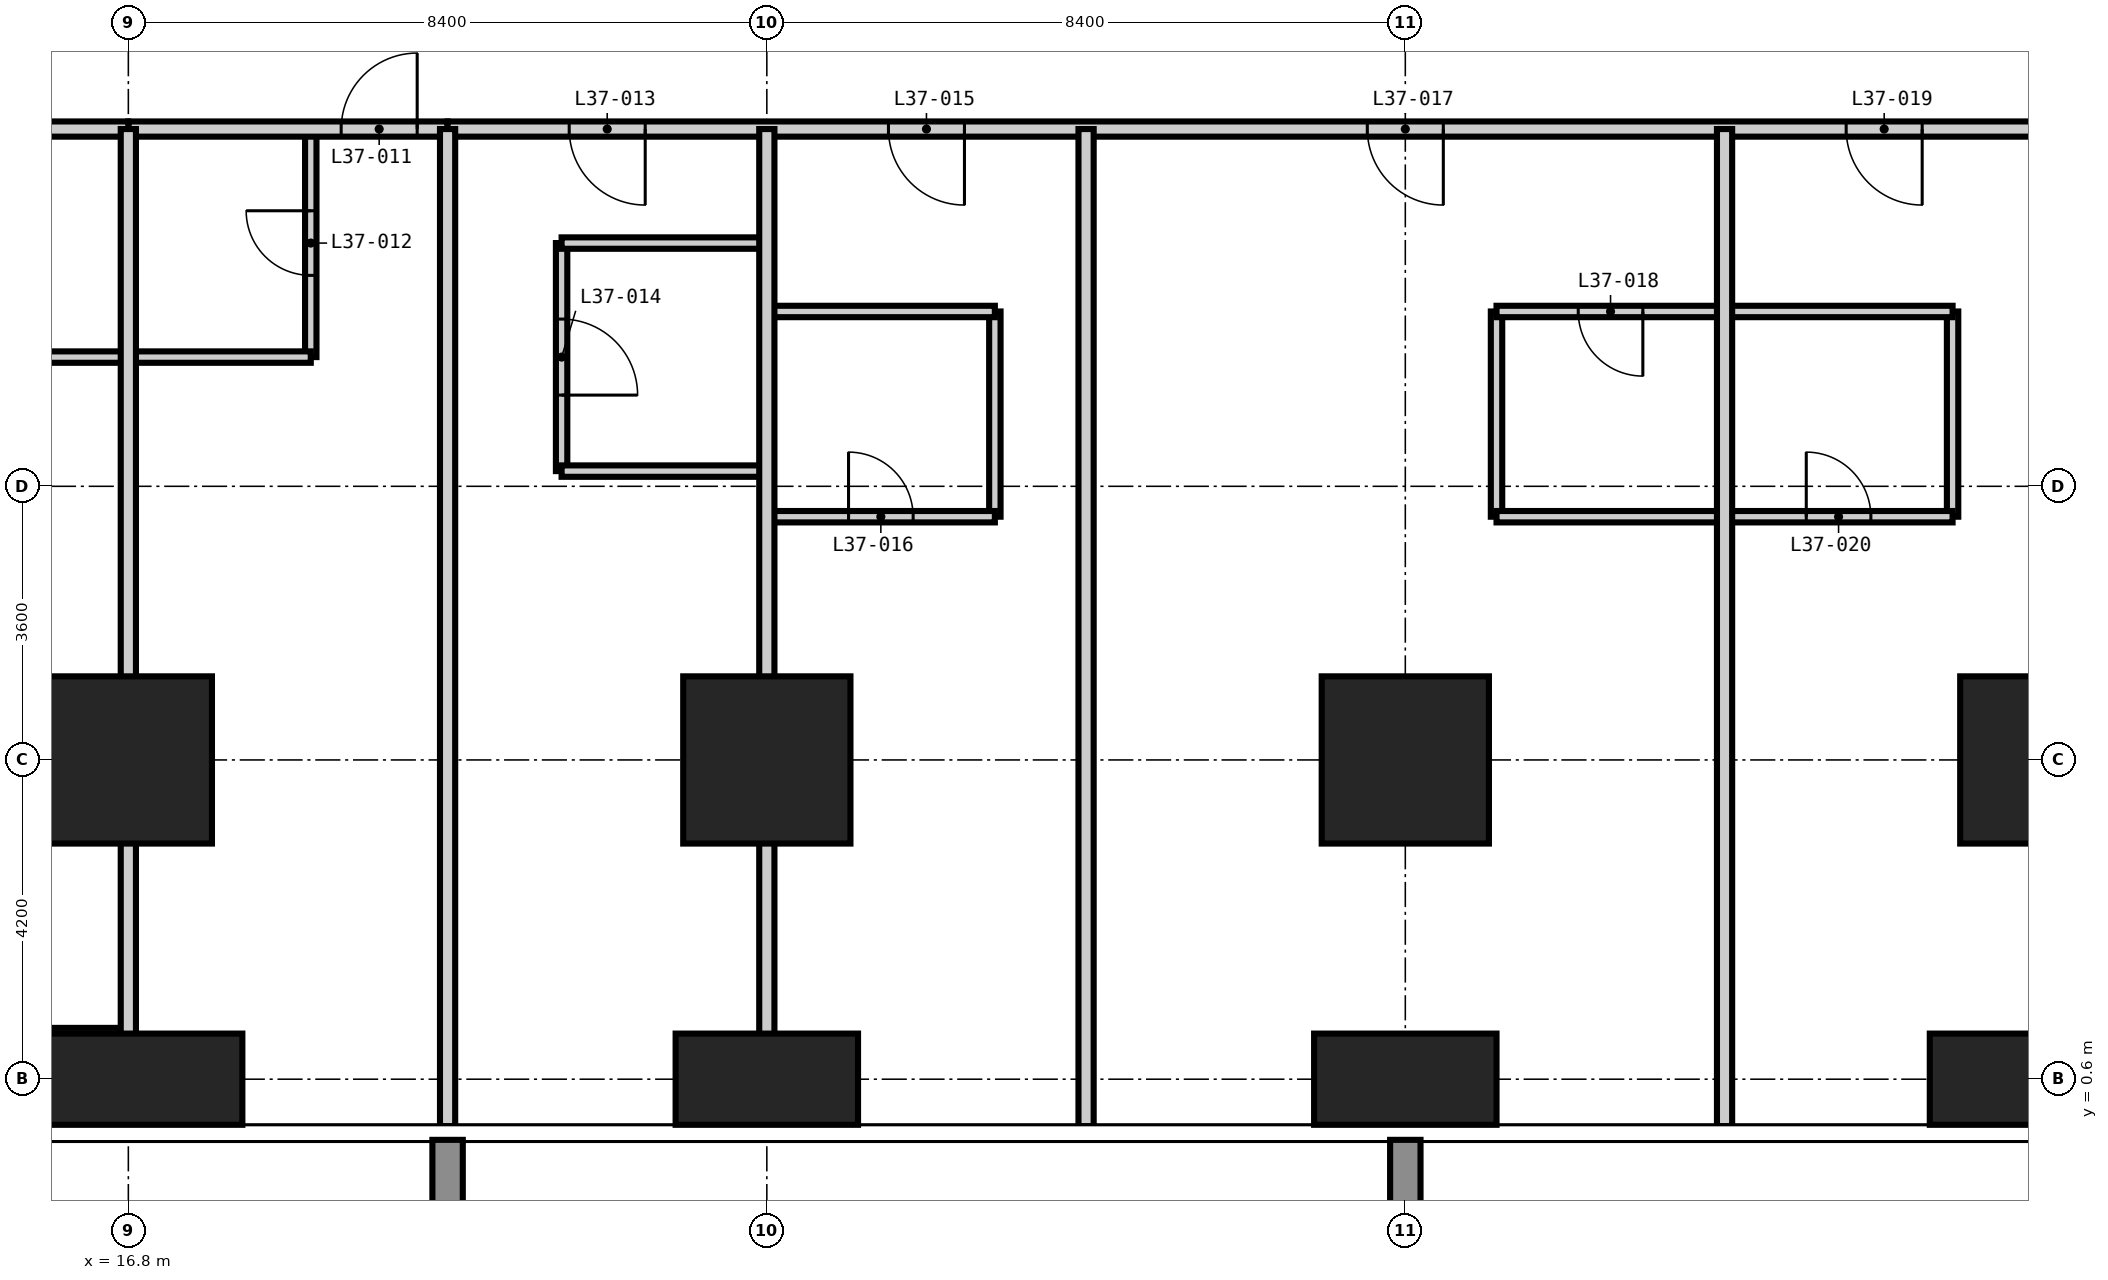
"""IFC4 building model, lengths in metres.
Left out: names, types, materials, properties, quantities, classifications, styles, units other than length and angle.
Written with IfcOpenShell. Run it as: python <this file> out.ifc"""

import sys

from ifc_helpers import new_model, si_unit, direction, frame, frame_2d, origin, origin_2d, place, context, subcontext, project, spatial, rectangle, extrude, element, fill, save


model = new_model("IFC4")
c1 = context("Model", 3, precision=1e-05, world=origin(), true_north=direction((0.0, 1.0)))
c2 = subcontext(c1, "Body", "Model", "MODEL_VIEW")
j1 = project(units=[si_unit("LENGTHUNIT", "METRE"), si_unit("PLANEANGLEUNIT", "RADIAN")], contexts=[c1])
p1 = place(None, origin())
s1 = spatial("IfcSite", under=j1, at=p1, CompositionType="ELEMENT")
p2 = place(p1, origin())
s2 = spatial("IfcBuilding", under=s1, at=p2, CompositionType="ELEMENT")
p3 = place(p2, frame((0.0, 0.0, 144.0)))
s3 = spatial("IfcBuildingStorey", under=s2, at=p3, CompositionType="ELEMENT", Elevation=144.0)
p4 = place(p3, frame((16.8, 0.6, -0.35), z_axis=(0.0, 0.0, 1.0), x_axis=(1.0, 0.0, 0.0)))
e1 = element("IfcColumn", 1, at=p4, inside=s3, PredefinedType="COLUMN", context=c2, shape_type="SweptSolid", body=[
    extrude(rectangle(XDim=3.0, YDim=1.2, at=origin_2d()), origin(), (0.0, 0.0, 1.0), 3.6),
])
p5 = place(p3, frame((16.8, 4.8, -0.35), z_axis=(0.0, 0.0, 1.0), x_axis=(1.0, 0.0, 0.0)))
e2 = element("IfcColumn", 2, at=p5, inside=s3, PredefinedType="COLUMN", context=c2, shape_type="SweptSolid", body=[
    extrude(rectangle(XDim=2.2, YDim=2.2, at=origin_2d()), origin(), (0.0, 0.0, 1.0), 3.6),
])
p6 = place(p3, frame((25.2, 0.6, -0.35), z_axis=(0.0, 0.0, 1.0), x_axis=(1.0, 0.0, 0.0)))
e3 = element("IfcColumn", 3, at=p6, inside=s3, PredefinedType="COLUMN", context=c2, shape_type="SweptSolid", body=[
    extrude(rectangle(XDim=2.4, YDim=1.2, at=origin_2d()), origin(), (0.0, 0.0, 1.0), 3.6),
])
p7 = place(p3, frame((25.2, 4.8, -0.35), z_axis=(0.0, 0.0, 1.0), x_axis=(1.0, 0.0, 0.0)))
e4 = element("IfcColumn", 4, at=p7, inside=s3, PredefinedType="COLUMN", context=c2, shape_type="SweptSolid", body=[
    extrude(rectangle(XDim=2.2, YDim=2.2, at=origin_2d()), origin(), (0.0, 0.0, 1.0), 3.6),
])
p8 = place(p3, frame((33.6, 0.6, -0.35), z_axis=(0.0, 0.0, 1.0), x_axis=(1.0, 0.0, 0.0)))
e5 = element("IfcColumn", 5, at=p8, inside=s3, PredefinedType="COLUMN", context=c2, shape_type="SweptSolid", body=[
    extrude(rectangle(XDim=2.4, YDim=1.2, at=origin_2d()), origin(), (0.0, 0.0, 1.0), 3.6),
])
p9 = place(p3, frame((33.6, 4.8, -0.35), z_axis=(0.0, 0.0, 1.0), x_axis=(1.0, 0.0, 0.0)))
e6 = element("IfcColumn", 6, at=p9, inside=s3, PredefinedType="COLUMN", context=c2, shape_type="SweptSolid", body=[
    extrude(rectangle(XDim=2.2, YDim=2.2, at=origin_2d()), origin(), (0.0, 0.0, 1.0), 3.6),
])
p10 = place(p3, frame((42.0, 0.6, -0.35), z_axis=(0.0, 0.0, 1.0), x_axis=(1.0, 0.0, 0.0)))
e7 = element("IfcColumn", 7, at=p10, inside=s3, PredefinedType="COLUMN", context=c2, shape_type="SweptSolid", body=[
    extrude(rectangle(XDim=3.0, YDim=1.2, at=origin_2d()), origin(), (0.0, 0.0, 1.0), 3.6),
])
p11 = place(p3, frame((42.0, 4.8, -0.35), z_axis=(0.0, 0.0, 1.0), x_axis=(1.0, 0.0, 0.0)))
e8 = element("IfcColumn", 8, at=p11, inside=s3, PredefinedType="COLUMN", context=c2, shape_type="SweptSolid", body=[
    extrude(rectangle(XDim=2.2, YDim=2.2, at=origin_2d()), origin(), (0.0, 0.0, 1.0), 3.6),
])
p12 = place(p3, frame((19.2, 10.1, 0.0), z_axis=(0.0, 0.0, 1.0), x_axis=(0.0, 1.0, 0.0)))
e9 = element("IfcWall", 9, at=p12, inside=s3, PredefinedType="PARTITIONING", context=c2, shape_type="SweptSolid", body=[
    extrude(rectangle(XDim=3.0, YDim=0.15, at=frame_2d((1.5, 0.0))), origin(), (0.0, 0.0, 1.0), 3.25),
])
p13 = place(p12, frame((1.075, 0.0, 0.0)))
e10 = element("IfcOpeningElement", 10, at=p13, cuts=e9, PredefinedType="OPENING", context=c2, shape_type="SweptSolid", body=[
    extrude(rectangle(XDim=0.85, YDim=2.1, at=frame_2d((0.425, 1.05))), frame((0.0, 0.085, 0.0), z_axis=(0.0, -1.0, 0.0), x_axis=(1.0, 0.0, 0.0)), (0.0, 0.0, 1.0), 0.17),
])
p14 = place(p3, frame((22.5, 8.6, 0.0), z_axis=(0.0, 0.0, 1.0), x_axis=(0.0, 1.0, 0.0)))
e11 = element("IfcWall", 11, at=p14, inside=s3, PredefinedType="PARTITIONING", context=c2, shape_type="SweptSolid", body=[
    extrude(rectangle(XDim=3.0, YDim=0.15, at=frame_2d((1.5, 0.0))), origin(), (0.0, 0.0, 1.0), 3.25),
])
p15 = place(p14, frame((1.0, 0.0, 0.0)))
e12 = element("IfcOpeningElement", 12, at=p15, cuts=e11, PredefinedType="OPENING", context=c2, shape_type="SweptSolid", body=[
    extrude(rectangle(XDim=1.0, YDim=2.1, at=frame_2d((0.5, 1.05))), frame((0.0, 0.085, 0.0), z_axis=(0.0, -1.0, 0.0), x_axis=(1.0, 0.0, 0.0)), (0.0, 0.0, 1.0), 0.17),
])
for number, where, z_axis, x_axis in (
    (13, (28.2, 8.0, 0.0), (0.0, 0.0, 1.0), (0.0, 1.0, 0.0)),
    (14, (34.8, 8.0, 0.0), (0.0, 0.0, 1.0), (0.0, 1.0, 0.0)),
    (15, (40.8, 8.0, 0.0), (0.0, 0.0, 1.0), (0.0, 1.0, 0.0)),
):
    element("IfcWall", number, at=place(p3, frame(where, z_axis=z_axis, x_axis=x_axis)), inside=s3, PredefinedType="PARTITIONING", context=c2, shape_type="SweptSolid", body=[
        extrude(rectangle(XDim=2.7, YDim=0.15, at=frame_2d((1.35, 0.0))), origin(), (0.0, 0.0, 1.0), 3.25),
    ])
p16 = place(p3, frame((13.2, 1.2, 0.0), z_axis=(0.0, 0.0, 1.0), x_axis=(1.0, 0.0, 0.0)))
e16 = element("IfcWall", 16, at=p16, inside=s3, PredefinedType="PARTITIONING", context=c2, shape_type="SweptSolid", body=[
    extrude(rectangle(XDim=3.6, YDim=0.15, at=frame_2d((1.8, 0.0))), origin(), (0.0, 0.0, 1.0), 3.25),
])
p17 = place(p16, frame((1.175, 0.0, 0.0)))
e17 = element("IfcOpeningElement", 17, at=p17, cuts=e16, PredefinedType="OPENING", context=c2, shape_type="SweptSolid", body=[
    extrude(rectangle(XDim=0.85, YDim=2.1, at=frame_2d((0.425, 1.05))), frame((0.0, 0.085, 0.0), z_axis=(0.0, -1.0, 0.0), x_axis=(1.0, 0.0, 0.0)), (0.0, 0.0, 1.0), 0.17),
])
p18 = place(p3, frame((25.2, 8.0, 0.0), z_axis=(0.0, 0.0, 1.0), x_axis=(1.0, 0.0, 0.0)))
e18 = element("IfcWall", 18, at=p18, inside=s3, PredefinedType="PARTITIONING", context=c2, shape_type="SweptSolid", body=[
    extrude(rectangle(XDim=3.0, YDim=0.15, at=frame_2d((1.5, 0.0))), origin(), (0.0, 0.0, 1.0), 3.25),
])
p19 = place(p18, frame((1.075, 0.0, 0.0)))
e19 = element("IfcOpeningElement", 19, at=p19, cuts=e18, PredefinedType="OPENING", context=c2, shape_type="SweptSolid", body=[
    extrude(rectangle(XDim=0.85, YDim=2.1, at=frame_2d((0.425, 1.05))), frame((0.0, 0.085, 0.0), z_axis=(0.0, -1.0, 0.0), x_axis=(1.0, 0.0, 0.0)), (0.0, 0.0, 1.0), 0.17),
])
p20 = place(p3, frame((34.8, 8.0, 0.0), z_axis=(0.0, 0.0, 1.0), x_axis=(1.0, 0.0, 0.0)))
e20 = element("IfcWall", 20, at=p20, inside=s3, PredefinedType="PARTITIONING", context=c2, shape_type="SweptSolid", body=[
    extrude(rectangle(XDim=6.0, YDim=0.15, at=frame_2d((3.0, 0.0))), origin(), (0.0, 0.0, 1.0), 3.25),
])
p21 = place(p20, frame((4.075, 0.0, 0.0)))
e21 = element("IfcOpeningElement", 21, at=p21, cuts=e20, PredefinedType="OPENING", context=c2, shape_type="SweptSolid", body=[
    extrude(rectangle(XDim=0.85, YDim=2.1, at=frame_2d((0.425, 1.05))), frame((0.0, 0.085, 0.0), z_axis=(0.0, -1.0, 0.0), x_axis=(1.0, 0.0, 0.0)), (0.0, 0.0, 1.0), 0.17),
])
p22 = place(p3, frame((22.5, 8.6, 0.0), z_axis=(0.0, 0.0, 1.0), x_axis=(1.0, 0.0, 0.0)))
e22 = element("IfcWall", 22, at=p22, inside=s3, PredefinedType="PARTITIONING", context=c2, shape_type="SweptSolid", body=[
    extrude(rectangle(XDim=2.7, YDim=0.15, at=frame_2d((1.35, 0.0))), origin(), (0.0, 0.0, 1.0), 3.25),
])
p23 = place(p3, frame((12.6, 10.1, 0.0), z_axis=(0.0, 0.0, 1.0), x_axis=(1.0, 0.0, 0.0)))
e23 = element("IfcWall", 23, at=p23, inside=s3, PredefinedType="PARTITIONING", context=c2, shape_type="SweptSolid", body=[
    extrude(rectangle(XDim=6.6, YDim=0.15, at=frame_2d((3.3, 0.0))), origin(), (0.0, 0.0, 1.0), 3.25),
])
p24 = place(p23, frame((1.675, 0.0, 0.0)))
e24 = element("IfcOpeningElement", 24, at=p24, cuts=e23, PredefinedType="OPENING", context=c2, shape_type="SweptSolid", body=[
    extrude(rectangle(XDim=0.85, YDim=2.1, at=frame_2d((0.425, 1.05))), frame((0.0, 0.085, 0.0), z_axis=(0.0, -1.0, 0.0), x_axis=(1.0, 0.0, 0.0)), (0.0, 0.0, 1.0), 0.17),
])
p25 = place(p3, frame((25.2, 10.7, 0.0), z_axis=(0.0, 0.0, 1.0), x_axis=(1.0, 0.0, 0.0)))
e25 = element("IfcWall", 25, at=p25, inside=s3, PredefinedType="PARTITIONING", context=c2, shape_type="SweptSolid", body=[
    extrude(rectangle(XDim=3.0, YDim=0.15, at=frame_2d((1.5, 0.0))), origin(), (0.0, 0.0, 1.0), 3.25),
])
p26 = place(p3, frame((34.8, 10.7, 0.0), z_axis=(0.0, 0.0, 1.0), x_axis=(1.0, 0.0, 0.0)))
e26 = element("IfcWall", 26, at=p26, inside=s3, PredefinedType="PARTITIONING", context=c2, shape_type="SweptSolid", body=[
    extrude(rectangle(XDim=6.0, YDim=0.15, at=frame_2d((3.0, 0.0))), origin(), (0.0, 0.0, 1.0), 3.25),
])
p27 = place(p26, frame((1.075, 0.0, 0.0)))
e27 = element("IfcOpeningElement", 27, at=p27, cuts=e26, PredefinedType="OPENING", context=c2, shape_type="SweptSolid", body=[
    extrude(rectangle(XDim=0.85, YDim=2.1, at=frame_2d((0.425, 1.05))), frame((0.0, 0.085, 0.0), z_axis=(0.0, -1.0, 0.0), x_axis=(1.0, 0.0, 0.0)), (0.0, 0.0, 1.0), 0.17),
])
p28 = place(p3, frame((22.5, 11.6, 0.0), z_axis=(0.0, 0.0, 1.0), x_axis=(1.0, 0.0, 0.0)))
e28 = element("IfcWall", 28, at=p28, inside=s3, PredefinedType="PARTITIONING", context=c2, shape_type="SweptSolid", body=[
    extrude(rectangle(XDim=2.7, YDim=0.15, at=frame_2d((1.35, 0.0))), origin(), (0.0, 0.0, 1.0), 3.25),
])
p29 = place(p3, frame((16.8, 13.1, 0.0), z_axis=(0.0, 0.0, 1.0), x_axis=(1.0, 0.0, 0.0)))
e29 = element("IfcWall", 29, at=p29, inside=s3, PredefinedType="PARTITIONING", context=c2, shape_type="SweptSolid", body=[
    extrude(rectangle(XDim=4.2, YDim=0.2, at=frame_2d((2.1, 0.0))), origin(), (0.0, 0.0, 1.0), 3.25),
])
p30 = place(p29, frame((2.8, 0.0, 0.0)))
e30 = element("IfcOpeningElement", 30, at=p30, cuts=e29, PredefinedType="OPENING", context=c2, shape_type="SweptSolid", body=[
    extrude(rectangle(XDim=1.0, YDim=2.2, at=frame_2d((0.5, 1.1))), frame((0.0, 0.11, 0.0), z_axis=(0.0, -1.0, 0.0), x_axis=(1.0, 0.0, 0.0)), (0.0, 0.0, 1.0), 0.22),
])
p31 = place(p3, frame((16.8, 13.1, 0.0), z_axis=(0.0, 0.0, 1.0), x_axis=(-1.0, 0.0, 0.0)))
e31 = element("IfcWall", 31, at=p31, inside=s3, PredefinedType="PARTITIONING", context=c2, shape_type="SweptSolid", body=[
    extrude(rectangle(XDim=4.2, YDim=0.2, at=frame_2d((2.1, 0.0))), origin(), (0.0, 0.0, 1.0), 3.25),
])
p32 = place(p3, frame((45.1, 13.1, 0.0), z_axis=(0.0, 0.0, 1.0), x_axis=(-1.0, 0.0, 0.0)))
e32 = element("IfcWall", 32, at=p32, inside=s3, PredefinedType="PARTITIONING", context=c2, shape_type="SweptSolid", body=[
    extrude(rectangle(XDim=24.1, YDim=0.2, at=frame_2d((12.05, 0.0))), origin(), (0.0, 0.0, 1.0), 3.25),
])
p33 = place(p32, frame((21.5, 0.0, 0.0)))
e33 = element("IfcOpeningElement", 33, at=p33, cuts=e32, PredefinedType="OPENING", context=c2, shape_type="SweptSolid", body=[
    extrude(rectangle(XDim=1.0, YDim=2.2, at=frame_2d((0.5, 1.1))), frame((0.0, 0.11, 0.0), z_axis=(0.0, -1.0, 0.0), x_axis=(1.0, 0.0, 0.0)), (0.0, 0.0, 1.0), 0.22),
])
p34 = place(p32, frame((17.3, 0.0, 0.0)))
e34 = element("IfcOpeningElement", 34, at=p34, cuts=e32, PredefinedType="OPENING", context=c2, shape_type="SweptSolid", body=[
    extrude(rectangle(XDim=1.0, YDim=2.2, at=frame_2d((0.5, 1.1))), frame((0.0, 0.11, 0.0), z_axis=(0.0, -1.0, 0.0), x_axis=(1.0, 0.0, 0.0)), (0.0, 0.0, 1.0), 0.22),
])
p35 = place(p32, frame((11.0, 0.0, 0.0)))
e35 = element("IfcOpeningElement", 35, at=p35, cuts=e32, PredefinedType="OPENING", context=c2, shape_type="SweptSolid", body=[
    extrude(rectangle(XDim=1.0, YDim=2.2, at=frame_2d((0.5, 1.1))), frame((0.0, 0.11, 0.0), z_axis=(0.0, -1.0, 0.0), x_axis=(1.0, 0.0, 0.0)), (0.0, 0.0, 1.0), 0.22),
])
p36 = place(p32, frame((4.7, 0.0, 0.0)))
e36 = element("IfcOpeningElement", 36, at=p36, cuts=e32, PredefinedType="OPENING", context=c2, shape_type="SweptSolid", body=[
    extrude(rectangle(XDim=1.0, YDim=2.2, at=frame_2d((0.5, 1.1))), frame((0.0, 0.11, 0.0), z_axis=(0.0, -1.0, 0.0), x_axis=(1.0, 0.0, 0.0)), (0.0, 0.0, 1.0), 0.22),
])
for number, where, z_axis, x_axis in (
    (37, (16.8, -0.018, 0.0), (0.0, 0.0, 1.0), (0.0, 1.0, 0.0)),
    (38, (21.0, -0.018, 0.0), (0.0, 0.0, 1.0), (0.0, 1.0, 0.0)),
    (39, (25.2, -0.018, 0.0), (0.0, 0.0, 1.0), (0.0, 1.0, 0.0)),
    (40, (29.4, -0.018, 0.0), (0.0, 0.0, 1.0), (0.0, 1.0, 0.0)),
    (41, (37.8, -0.018, 0.0), (0.0, 0.0, 1.0), (0.0, 1.0, 0.0)),
):
    element("IfcWall", number, at=place(p3, frame(where, z_axis=z_axis, x_axis=x_axis)), inside=s3, PredefinedType="PARTITIONING", context=c2, shape_type="SweptSolid", body=[
        extrude(rectangle(XDim=13.118, YDim=0.2, at=frame_2d((6.559, 0.0))), origin(), (0.0, 0.0, 1.0), 3.25),
    ])
p37 = place(p3, frame((-0.018, 4.2, 0.0), z_axis=(0.0, 0.0, 1.0), x_axis=(1.0, 0.0, 0.0)))
e42 = element("IfcWall", 42, at=p37, inside=s3, PredefinedType="PARTITIONING", context=c2, shape_type="SweptSolid", body=[
    extrude(rectangle(XDim=16.818, YDim=0.15, at=frame_2d((8.409, 0.0))), origin(), (0.0, 0.0, 1.0), 3.25),
])
p38 = place(p37, frame((4.968, 0.0, 0.0)))
e43 = element("IfcOpeningElement", 43, at=p38, cuts=e42, PredefinedType="OPENING", context=c2, shape_type="SweptSolid", body=[
    extrude(rectangle(XDim=0.9, YDim=2.1, at=frame_2d((0.45, 1.05))), frame((0.0, 0.085, 0.0), z_axis=(0.0, -1.0, 0.0), x_axis=(1.0, 0.0, 0.0)), (0.0, 0.0, 1.0), 0.17),
])
p39 = place(p30, origin())
e44 = element("IfcDoor", 44, at=p39, inside=s3, OperationType="SINGLE_SWING_RIGHT", PredefinedType="DOOR", context=c2, shape_type="SweptSolid", body=[
    extrude(rectangle(XDim=1.0, YDim=2.2, at=frame_2d((0.5, 1.1))), frame((0.0, 0.025, 0.0), z_axis=(0.0, -1.0, 0.0), x_axis=(1.0, 0.0, 0.0)), (0.0, 0.0, 1.0), 0.05),
])
fill(e30, e44)
p40 = place(p13, origin())
e45 = element("IfcDoor", 45, at=p40, inside=s3, OperationType="SINGLE_SWING_RIGHT", PredefinedType="DOOR", context=c2, shape_type="SweptSolid", body=[
    extrude(rectangle(XDim=0.85, YDim=2.1, at=frame_2d((0.425, 1.05))), frame((0.0, 0.025, 0.0), z_axis=(0.0, -1.0, 0.0), x_axis=(1.0, 0.0, 0.0)), (0.0, 0.0, 1.0), 0.05),
])
fill(e10, e45)
p41 = place(p33, origin())
e46 = element("IfcDoor", 46, at=p41, inside=s3, OperationType="SINGLE_SWING_LEFT", PredefinedType="DOOR", context=c2, shape_type="SweptSolid", body=[
    extrude(rectangle(XDim=1.0, YDim=2.2, at=frame_2d((0.5, 1.1))), frame((0.0, 0.025, 0.0), z_axis=(0.0, -1.0, 0.0), x_axis=(1.0, 0.0, 0.0)), (0.0, 0.0, 1.0), 0.05),
])
fill(e33, e46)
p42 = place(p15, frame((1.0, 0.0, 0.0), z_axis=(0.0, 0.0, 1.0), x_axis=(-1.0, 0.0, 0.0)))
e47 = element("IfcDoor", 47, at=p42, inside=s3, OperationType="SINGLE_SWING_RIGHT", PredefinedType="DOOR", context=c2, shape_type="SweptSolid", body=[
    extrude(rectangle(XDim=1.0, YDim=2.1, at=frame_2d((0.5, 1.05))), frame((0.0, 0.025, 0.0), z_axis=(0.0, -1.0, 0.0), x_axis=(1.0, 0.0, 0.0)), (0.0, 0.0, 1.0), 0.05),
])
fill(e12, e47)
p43 = place(p34, origin())
e48 = element("IfcDoor", 48, at=p43, inside=s3, OperationType="SINGLE_SWING_LEFT", PredefinedType="DOOR", context=c2, shape_type="SweptSolid", body=[
    extrude(rectangle(XDim=1.0, YDim=2.2, at=frame_2d((0.5, 1.1))), frame((0.0, 0.025, 0.0), z_axis=(0.0, -1.0, 0.0), x_axis=(1.0, 0.0, 0.0)), (0.0, 0.0, 1.0), 0.05),
])
fill(e34, e48)
p44 = place(p19, origin())
e49 = element("IfcDoor", 49, at=p44, inside=s3, OperationType="SINGLE_SWING_LEFT", PredefinedType="DOOR", context=c2, shape_type="SweptSolid", body=[
    extrude(rectangle(XDim=0.85, YDim=2.1, at=frame_2d((0.425, 1.05))), frame((0.0, 0.025, 0.0), z_axis=(0.0, -1.0, 0.0), x_axis=(1.0, 0.0, 0.0)), (0.0, 0.0, 1.0), 0.05),
])
fill(e19, e49)
p45 = place(p35, origin())
e50 = element("IfcDoor", 50, at=p45, inside=s3, OperationType="SINGLE_SWING_LEFT", PredefinedType="DOOR", context=c2, shape_type="SweptSolid", body=[
    extrude(rectangle(XDim=1.0, YDim=2.2, at=frame_2d((0.5, 1.1))), frame((0.0, 0.025, 0.0), z_axis=(0.0, -1.0, 0.0), x_axis=(1.0, 0.0, 0.0)), (0.0, 0.0, 1.0), 0.05),
])
fill(e35, e50)
p46 = place(p27, frame((0.85, 0.0, 0.0), z_axis=(0.0, 0.0, 1.0), x_axis=(-1.0, 0.0, 0.0)))
e51 = element("IfcDoor", 51, at=p46, inside=s3, OperationType="SINGLE_SWING_LEFT", PredefinedType="DOOR", context=c2, shape_type="SweptSolid", body=[
    extrude(rectangle(XDim=0.85, YDim=2.1, at=frame_2d((0.425, 1.05))), frame((0.0, 0.025, 0.0), z_axis=(0.0, -1.0, 0.0), x_axis=(1.0, 0.0, 0.0)), (0.0, 0.0, 1.0), 0.05),
])
fill(e27, e51)
p47 = place(p36, origin())
e52 = element("IfcDoor", 52, at=p47, inside=s3, OperationType="SINGLE_SWING_LEFT", PredefinedType="DOOR", context=c2, shape_type="SweptSolid", body=[
    extrude(rectangle(XDim=1.0, YDim=2.2, at=frame_2d((0.5, 1.1))), frame((0.0, 0.025, 0.0), z_axis=(0.0, -1.0, 0.0), x_axis=(1.0, 0.0, 0.0)), (0.0, 0.0, 1.0), 0.05),
])
fill(e36, e52)
p48 = place(p21, origin())
e53 = element("IfcDoor", 53, at=p48, inside=s3, OperationType="SINGLE_SWING_LEFT", PredefinedType="DOOR", context=c2, shape_type="SweptSolid", body=[
    extrude(rectangle(XDim=0.85, YDim=2.1, at=frame_2d((0.425, 1.05))), frame((0.0, 0.025, 0.0), z_axis=(0.0, -1.0, 0.0), x_axis=(1.0, 0.0, 0.0)), (0.0, 0.0, 1.0), 0.05),
])
fill(e21, e53)
save(model, sys.argv[1])
